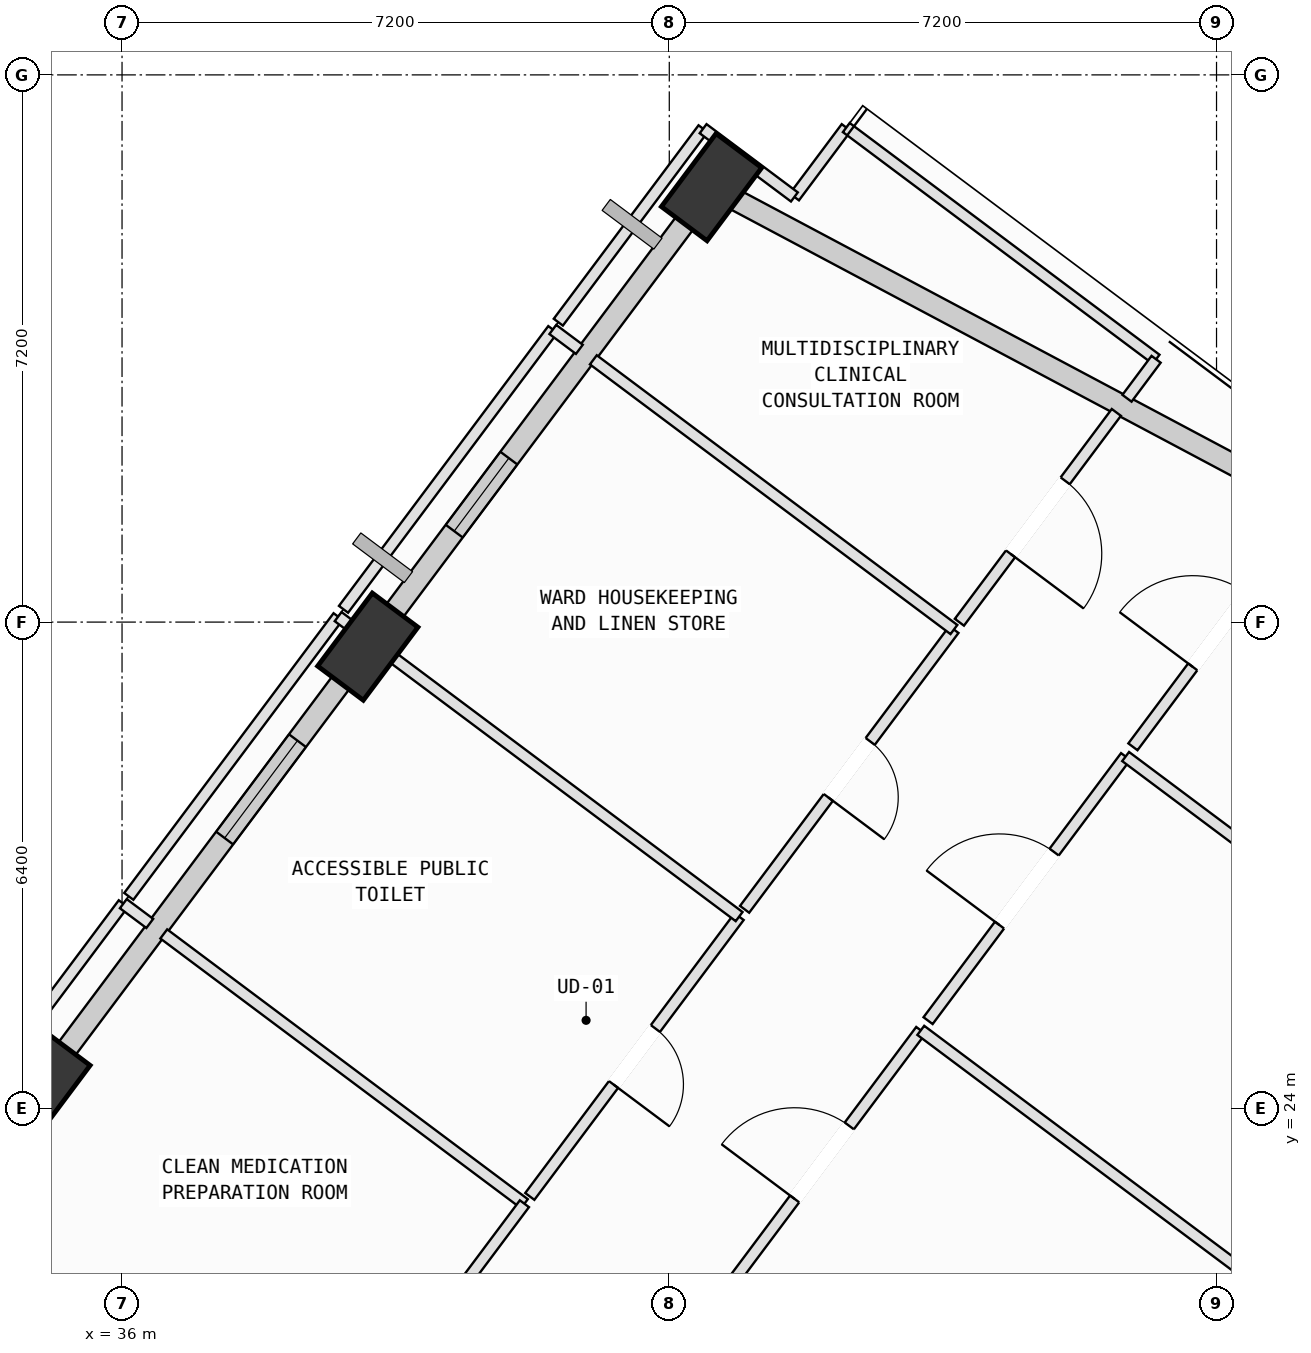
"""IFC4 building model, lengths in metres.
Left out: names, types, materials, properties, quantities, classifications, styles, units other than length and angle.
Written with IfcOpenShell. Run it as: python <this file> out.ifc"""

import sys

from ifc_helpers import new_model, si_unit, direction, frame, frame_2d, origin, origin_2d, place, context, subcontext, project, spatial, rectangle, extrude, element, fill, save


model = new_model("IFC4")
c1 = context("Model", 3, precision=1e-05, world=origin(), true_north=direction((0.0, 1.0)))
c2 = subcontext(c1, "Body", "Model", "MODEL_VIEW")
j1 = project(units=[si_unit("LENGTHUNIT", "METRE"), si_unit("PLANEANGLEUNIT", "RADIAN")], contexts=[c1])
p1 = place(None, origin())
s1 = spatial("IfcSite", under=j1, at=p1, CompositionType="ELEMENT")
p2 = place(p1, origin())
s2 = spatial("IfcBuilding", under=s1, at=p2, CompositionType="ELEMENT")
p3 = place(p2, frame((0.0, 0.0, 251.2)))
s3 = spatial("IfcBuildingStorey", under=s2, at=p3, CompositionType="ELEMENT", Elevation=251.2)
p4 = place(p3, frame((43.756, 36.123, 0.002), z_axis=(-0.047190879507, 0.041581627679, 0.998020034434), x_axis=(0.203571858613, -0.977763785385, 0.050363462655)))
e1 = element("IfcColumn", 1, at=p4, inside=s3, PredefinedType="COLUMN", context=c2, shape_type="SweptSolid", body=[
    extrude(rectangle(XDim=1.2, YDim=0.75, at=origin_2d()), origin(), (0.0, 0.0, 1.0), 4.004),
])
p5 = place(p3, frame((39.234, 30.077, 0.002), z_axis=(-0.022103646467, 0.023141663014, 0.999487814956), x_axis=(0.119606697095, -0.992490609575, 0.025624751993)))
e2 = element("IfcColumn", 2, at=p5, inside=s3, PredefinedType="COLUMN", context=c2, shape_type="SweptSolid", body=[
    extrude(rectangle(XDim=1.2, YDim=0.75, at=origin_2d()), origin(), (0.0, 0.0, 1.0), 3.998),
])
p6 = place(p3, frame((34.921, 24.312, 0.002), z_axis=(0.001954881495, 0.005498104203, 0.999982974499), x_axis=(-0.83265701767, -0.553769318945, 0.004672506767)))
e3 = element("IfcColumn", 3, at=p6, inside=s3, PredefinedType="COLUMN", context=c2, shape_type="SweptSolid", body=[
    extrude(rectangle(XDim=1.2, YDim=0.75, at=origin_2d()), origin(), (0.0, 0.0, 1.0), 3.996),
])
p7 = place(p3, frame((43.998, 35.994, 0.0), z_axis=(0.0, 0.0, 1.0), x_axis=(0.88287143587, -0.469614765233, 0.0)))
e4 = element("IfcWall", 4, at=p7, inside=s3, PredefinedType="SOLIDWALL", context=c2, shape_type="SweptSolid", body=[
    extrude(rectangle(XDim=9.036, YDim=0.28, at=frame_2d((4.518, 0.0))), origin(), (0.0, 0.0, 1.0), 3.265),
])
p8 = place(p3, frame((39.475, 30.4, 0.0), z_axis=(0.0, 0.0, 1.0), x_axis=(0.599014331177, 0.80073830372, 0.0)))
e5 = element("IfcWall", 5, at=p8, inside=s3, PredefinedType="SOLIDWALL", context=c2, shape_type="SweptSolid", body=[
    extrude(rectangle(XDim=6.78, YDim=0.28, at=frame_2d((3.39, 0.0))), origin(), (0.0, 0.0, 1.0), 3.265),
])
p9 = place(p8, frame((1.495, 0.0, 0.75)))
e6 = element("IfcOpeningElement", 6, at=p9, cuts=e5, PredefinedType="OPENING", context=c2, shape_type="SweptSolid", body=[
    extrude(rectangle(XDim=1.2, YDim=1.75, at=frame_2d((0.6, 0.875))), frame((0.0, 0.15, 0.0), z_axis=(0.0, -1.0, 0.0), x_axis=(1.0, 0.0, 0.0)), (0.0, 0.0, 1.0), 0.3),
])
p10 = place(p3, frame((35.165, 24.639, 0.0), z_axis=(0.0, 0.0, 1.0), x_axis=(0.599054928416, 0.800707932233, 0.0)))
e7 = element("IfcWall", 7, at=p10, inside=s3, PredefinedType="SOLIDWALL", context=c2, shape_type="SweptSolid", body=[
    extrude(rectangle(XDim=6.409, YDim=0.28, at=frame_2d((3.205, 0.0))), origin(), (0.0, 0.0, 1.0), 3.265),
])
p11 = place(p10, frame((3.646, 0.0, 0.75)))
e8 = element("IfcOpeningElement", 8, at=p11, cuts=e7, PredefinedType="OPENING", context=c2, shape_type="SweptSolid", body=[
    extrude(rectangle(XDim=1.6, YDim=1.95, at=frame_2d((0.8, 0.975))), frame((0.0, 0.15, 0.0), z_axis=(0.0, -1.0, 0.0), x_axis=(1.0, 0.0, 0.0)), (0.0, 0.0, 1.0), 0.3),
])
p12 = place(p3, frame((43.909, 21.553, 0.0), z_axis=(0.0, 0.0, 1.0), x_axis=(0.599081575716, 0.800687995187, 0.0)))
e9 = element("IfcWall", 9, at=p12, inside=s3, PredefinedType="PARTITIONING", context=c2, shape_type="SweptSolid", body=[
    extrude(rectangle(XDim=4.34, YDim=0.15, at=frame_2d((2.17, 0.0))), origin(), (0.0, 0.0, 1.0), 3.78),
])
p13 = place(p12, frame((1.57, 0.0, 0.0)))
e10 = element("IfcOpeningElement", 10, at=p13, cuts=e9, PredefinedType="OPENING", context=c2, shape_type="SweptSolid", body=[
    extrude(rectangle(XDim=1.2, YDim=2.15, at=frame_2d((0.6, 1.075))), frame((0.0, 0.085, 0.0), z_axis=(0.0, -1.0, 0.0), x_axis=(1.0, 0.0, 0.0)), (0.0, 0.0, 1.0), 0.17),
])
p14 = place(p3, frame((46.509, 25.028, 0.0), z_axis=(0.0, 0.0, 1.0), x_axis=(0.800743159028, -0.599007840741, 0.0)))
e11 = element("IfcWall", 11, at=p14, inside=s3, PredefinedType="PARTITIONING", context=c2, shape_type="SweptSolid", body=[
    extrude(rectangle(XDim=11.935, YDim=0.15, at=frame_2d((5.968, 0.0))), origin(), (0.0, 0.0, 1.0), 3.78),
])
p15 = place(p3, frame((46.605, 25.156, 0.0), z_axis=(0.0, 0.0, 1.0), x_axis=(0.598937294168, 0.800795927596, 0.0)))
e12 = element("IfcWall", 12, at=p15, inside=s3, PredefinedType="PARTITIONING", context=c2, shape_type="SweptSolid", body=[
    extrude(rectangle(XDim=4.34, YDim=0.15, at=frame_2d((2.17, 0.0))), origin(), (0.0, 0.0, 1.0), 3.78),
])
p16 = place(p15, frame((1.57, 0.0, 0.0)))
e13 = element("IfcOpeningElement", 13, at=p16, cuts=e12, PredefinedType="OPENING", context=c2, shape_type="SweptSolid", body=[
    extrude(rectangle(XDim=1.2, YDim=2.15, at=frame_2d((0.6, 1.075))), frame((0.0, 0.085, 0.0), z_axis=(0.0, -1.0, 0.0), x_axis=(1.0, 0.0, 0.0)), (0.0, 0.0, 1.0), 0.17),
])
p17 = place(p3, frame((49.204, 28.631, 0.0), z_axis=(0.0, 0.0, 1.0), x_axis=(0.800718737754, -0.599040485284, 0.0)))
e14 = element("IfcWall", 14, at=p17, inside=s3, PredefinedType="PARTITIONING", context=c2, shape_type="SweptSolid", body=[
    extrude(rectangle(XDim=11.363, YDim=0.15, at=frame_2d((5.682, 0.0))), origin(), (0.0, 0.0, 1.0), 3.78),
])
p18 = place(p3, frame((49.3, 28.759, 0.0), z_axis=(0.0, 0.0, 1.0), x_axis=(0.599040287777, 0.800718885515, 0.0)))
e15 = element("IfcWall", 15, at=p18, inside=s3, PredefinedType="PARTITIONING", context=c2, shape_type="SweptSolid", body=[
    extrude(rectangle(XDim=3.828, YDim=0.15, at=frame_2d((1.914, 0.0))), origin(), (0.0, 0.0, 1.0), 3.78),
])
p19 = place(p18, frame((1.314, 0.0, 0.0)))
e16 = element("IfcOpeningElement", 16, at=p19, cuts=e15, PredefinedType="OPENING", context=c2, shape_type="SweptSolid", body=[
    extrude(rectangle(XDim=1.2, YDim=2.15, at=frame_2d((0.6, 1.075))), frame((0.0, 0.085, 0.0), z_axis=(0.0, -1.0, 0.0), x_axis=(1.0, 0.0, 0.0)), (0.0, 0.0, 1.0), 0.17),
])
p20 = place(p3, frame((33.263, 23.014, 0.0), z_axis=(0.0, 0.0, 1.0), x_axis=(0.599064962101, 0.800700425367, 0.0)))
e17 = element("IfcWall", 17, at=p20, inside=s3, PredefinedType="PARTITIONING", context=c2, shape_type="SweptSolid", body=[
    extrude(rectangle(XDim=4.597, YDim=0.15, at=frame_2d((2.299, 0.0))), origin(), (0.0, 0.0, 1.0), 3.78),
])
p21 = place(p3, frame((36.017, 26.695, 0.0), z_axis=(0.0, 0.0, 1.0), x_axis=(0.80101066545, -0.598650076284, 0.0)))
e18 = element("IfcWall", 18, at=p21, inside=s3, PredefinedType="PARTITIONING", context=c2, shape_type="SweptSolid", body=[
    extrude(rectangle(XDim=0.434, YDim=0.15, at=frame_2d((0.217, 0.0))), origin(), (0.0, 0.0, 1.0), 3.78),
])
p22 = place(p3, frame((36.549, 26.297, 0.0), z_axis=(0.0, 0.0, 1.0), x_axis=(0.800696541922, -0.599070152616, 0.0)))
e19 = element("IfcWall", 19, at=p22, inside=s3, PredefinedType="PARTITIONING", context=c2, shape_type="SweptSolid", body=[
    extrude(rectangle(XDim=5.926, YDim=0.15, at=frame_2d((2.963, 0.0))), origin(), (0.0, 0.0, 1.0), 3.78),
])
p23 = place(p3, frame((41.294, 22.747, 0.0), z_axis=(0.0, 0.0, 1.0), x_axis=(-0.599137256843, -0.800646331074, 0.0)))
e20 = element("IfcWall", 20, at=p23, inside=s3, PredefinedType="PARTITIONING", context=c2, shape_type="SweptSolid", body=[
    extrude(rectangle(XDim=2.582, YDim=0.15, at=frame_2d((1.291, 0.0))), origin(), (0.0, 0.0, 1.0), 3.78),
])
p24 = place(p3, frame((36.382, 20.68, 0.0), z_axis=(0.0, 0.0, 1.0), x_axis=(-0.800643257671, 0.599141363908, 0.0)))
e21 = element("IfcWall", 21, at=p24, inside=s3, PredefinedType="PARTITIONING", context=c2, shape_type="SweptSolid", body=[
    extrude(rectangle(XDim=3.231, YDim=0.15, at=frame_2d((1.616, 0.0))), origin(), (0.0, 0.0, 1.0), 3.78),
])
p25 = place(p3, frame((44.119, 26.525, 0.0), z_axis=(0.0, 0.0, 1.0), x_axis=(-0.598954503675, -0.800783055844, 0.0)))
e22 = element("IfcWall", 22, at=p25, inside=s3, PredefinedType="PARTITIONING", context=c2, shape_type="SweptSolid", body=[
    extrude(rectangle(XDim=4.598, YDim=0.15, at=frame_2d((2.299, 0.0))), origin(), (0.0, 0.0, 1.0), 3.78),
])
p26 = place(p25, frame((1.839, 0.0, 0.0)))
e23 = element("IfcOpeningElement", 23, at=p26, cuts=e22, PredefinedType="OPENING", context=c2, shape_type="SweptSolid", body=[
    extrude(rectangle(XDim=0.92, YDim=2.1, at=frame_2d((0.46, 1.05))), frame((0.0, 0.085, 0.0), z_axis=(0.0, -1.0, 0.0), x_axis=(1.0, 0.0, 0.0)), (0.0, 0.0, 1.0), 0.17),
])
p27 = place(p3, frame((36.089, 26.791, 0.0), z_axis=(0.0, 0.0, 1.0), x_axis=(0.599056387828, 0.800706840362, 0.0)))
e24 = element("IfcWall", 24, at=p27, inside=s3, PredefinedType="PARTITIONING", context=c2, shape_type="SweptSolid", body=[
    extrude(rectangle(XDim=4.597, YDim=0.15, at=frame_2d((2.299, 0.0))), origin(), (0.0, 0.0, 1.0), 3.265),
])
p28 = place(p3, frame((38.843, 30.472, 0.0), z_axis=(0.0, 0.0, 1.0), x_axis=(0.800719737782, -0.599039148576, 0.0)))
e25 = element("IfcWall", 25, at=p28, inside=s3, PredefinedType="PARTITIONING", context=c2, shape_type="SweptSolid", body=[
    extrude(rectangle(XDim=6.589, YDim=0.15, at=frame_2d((3.294, 0.0))), origin(), (0.0, 0.0, 1.0), 3.78),
])
p29 = place(p3, frame((46.945, 30.302, 0.0), z_axis=(0.0, 0.0, 1.0), x_axis=(-0.599090435307, -0.80068136629, 0.0)))
e26 = element("IfcWall", 26, at=p29, inside=s3, PredefinedType="PARTITIONING", context=c2, shape_type="SweptSolid", body=[
    extrude(rectangle(XDim=4.597, YDim=0.15, at=frame_2d((2.299, 0.0))), origin(), (0.0, 0.0, 1.0), 3.78),
])
p30 = place(p29, frame((1.839, 0.0, 0.0)))
e27 = element("IfcOpeningElement", 27, at=p30, cuts=e26, PredefinedType="OPENING", context=c2, shape_type="SweptSolid", body=[
    extrude(rectangle(XDim=0.92, YDim=2.1, at=frame_2d((0.46, 1.05))), frame((0.0, 0.085, 0.0), z_axis=(0.0, -1.0, 0.0), x_axis=(1.0, 0.0, 0.0)), (0.0, 0.0, 1.0), 0.17),
])
p31 = place(p3, frame((38.914, 30.568, 0.0), z_axis=(0.0, 0.0, 1.0), x_axis=(0.598954503675, 0.800783055844, 0.0)))
e28 = element("IfcWall", 28, at=p31, inside=s3, PredefinedType="PARTITIONING", context=c2, shape_type="SweptSolid", body=[
    extrude(rectangle(XDim=4.598, YDim=0.15, at=frame_2d((2.299, 0.0))), origin(), (0.0, 0.0, 1.0), 3.265),
])
p32 = place(p3, frame((41.668, 34.25, 0.0), z_axis=(0.0, 0.0, 1.0), x_axis=(0.800939980659, -0.598744642884, 0.0)))
e29 = element("IfcWall", 29, at=p32, inside=s3, PredefinedType="PARTITIONING", context=c2, shape_type="SweptSolid", body=[
    extrude(rectangle(XDim=0.436, YDim=0.15, at=frame_2d((0.218, 0.0))), origin(), (0.0, 0.0, 1.0), 3.78),
])
p33 = place(p3, frame((42.201, 33.851, 0.0), z_axis=(0.0, 0.0, 1.0), x_axis=(0.800731238319, -0.599023775805, 0.0)))
e30 = element("IfcWall", 30, at=p33, inside=s3, PredefinedType="PARTITIONING", context=c2, shape_type="SweptSolid", body=[
    extrude(rectangle(XDim=5.925, YDim=0.15, at=frame_2d((2.962, 0.0))), origin(), (0.0, 0.0, 1.0), 3.78),
])
p34 = place(p3, frame((44.846, 35.994, 0.0), z_axis=(0.0, 0.0, 1.0), x_axis=(0.599040418987, 0.800718787353, 0.0)))
e31 = element("IfcWall", 31, at=p34, inside=s3, PredefinedType="PARTITIONING", context=c2, shape_type="SweptSolid", body=[
    extrude(rectangle(XDim=1.14, YDim=0.15, at=frame_2d((0.57, 0.0))), origin(), (0.0, 0.0, 1.0), 3.78),
])
p35 = place(p3, frame((45.529, 36.907, 0.0), z_axis=(0.0, 0.0, 1.0), x_axis=(0.800741854333, -0.599009584831, 0.0)))
e32 = element("IfcWall", 32, at=p35, inside=s3, PredefinedType="PARTITIONING", context=c2, shape_type="SweptSolid", body=[
    extrude(rectangle(XDim=5.09, YDim=0.15, at=frame_2d((2.545, 0.0))), origin(), (0.0, 0.0, 1.0), 3.78),
])
p36 = place(p3, frame((49.605, 33.858, 0.0), z_axis=(0.0, 0.0, 1.0), x_axis=(-0.598351259645, -0.801233904725, 0.0)))
e33 = element("IfcWall", 33, at=p36, inside=s3, PredefinedType="PARTITIONING", context=c2, shape_type="SweptSolid", body=[
    extrude(rectangle(XDim=0.64, YDim=0.15, at=frame_2d((0.32, 0.0))), origin(), (0.0, 0.0, 1.0), 3.78),
])
p37 = place(p3, frame((49.082, 33.159, 0.0), z_axis=(0.0, 0.0, 1.0), x_axis=(-0.598923123133, -0.800806526308, 0.0)))
e34 = element("IfcWall", 34, at=p37, inside=s3, PredefinedType="PARTITIONING", context=c2, shape_type="SweptSolid", body=[
    extrude(rectangle(XDim=3.448, YDim=0.15, at=frame_2d((1.724, 0.0))), origin(), (0.0, 0.0, 1.0), 3.78),
])
p38 = place(p37, frame((1.124, 0.0, 0.0)))
e35 = element("IfcOpeningElement", 35, at=p38, cuts=e34, PredefinedType="OPENING", context=c2, shape_type="SweptSolid", body=[
    extrude(rectangle(XDim=1.2, YDim=2.15, at=frame_2d((0.6, 1.075))), frame((0.0, 0.085, 0.0), z_axis=(0.0, -1.0, 0.0), x_axis=(1.0, 0.0, 0.0)), (0.0, 0.0, 1.0), 0.17),
])
p39 = place(p3, frame((41.74, 34.346, 0.0), z_axis=(0.0, 0.0, 1.0), x_axis=(0.599078297552, 0.800690447927, 0.0)))
e36 = element("IfcWall", 36, at=p39, inside=s3, PredefinedType="PARTITIONING", context=c2, shape_type="SweptSolid", body=[
    extrude(rectangle(XDim=3.18, YDim=0.15, at=frame_2d((1.59, 0.0))), origin(), (0.0, 0.0, 1.0), 3.265),
])
p40 = place(p3, frame((43.645, 36.892, 0.0), z_axis=(0.0, 0.0, 1.0), x_axis=(0.800800250223, -0.598931514651, 0.0)))
e37 = element("IfcWall", 37, at=p40, inside=s3, PredefinedType="PARTITIONING", context=c2, shape_type="SweptSolid", body=[
    extrude(rectangle(XDim=1.5, YDim=0.15, at=frame_2d((0.75, 0.0))), origin(), (0.0, 0.0, 1.0), 3.265),
])
p41 = place(p9, origin())
e38 = element("IfcWindow", 38, at=p41, inside=s3, PartitioningType="SINGLE_PANEL", PredefinedType="WINDOW", context=c2, shape_type="SweptSolid", body=[
    extrude(rectangle(XDim=1.2, YDim=1.75, at=frame_2d((0.6, 0.875))), frame((0.0, 0.03, 0.0), z_axis=(0.0, -1.0, 0.0), x_axis=(1.0, 0.0, 0.0)), (0.0, 0.0, 1.0), 0.06),
])
fill(e6, e38)
p42 = place(p11, origin())
e39 = element("IfcWindow", 39, at=p42, inside=s3, PartitioningType="SINGLE_PANEL", PredefinedType="WINDOW", context=c2, shape_type="SweptSolid", body=[
    extrude(rectangle(XDim=1.6, YDim=1.95, at=frame_2d((0.8, 0.975))), frame((0.0, 0.03, 0.0), z_axis=(0.0, -1.0, 0.0), x_axis=(1.0, 0.0, 0.0)), (0.0, 0.0, 1.0), 0.06),
])
fill(e8, e39)
p43 = place(p13, origin())
e40 = element("IfcDoor", 40, at=p43, inside=s3, OperationType="SINGLE_SWING_LEFT", PredefinedType="DOOR", context=c2, shape_type="SweptSolid", body=[
    extrude(rectangle(XDim=1.2, YDim=2.15, at=frame_2d((0.6, 1.075))), frame((0.0, 0.025, 0.0), z_axis=(0.0, -1.0, 0.0), x_axis=(1.0, 0.0, 0.0)), (0.0, 0.0, 1.0), 0.05),
])
fill(e10, e40)
p44 = place(p16, origin())
e41 = element("IfcDoor", 41, at=p44, inside=s3, OperationType="SINGLE_SWING_LEFT", PredefinedType="DOOR", context=c2, shape_type="SweptSolid", body=[
    extrude(rectangle(XDim=1.2, YDim=2.15, at=frame_2d((0.6, 1.075))), frame((0.0, 0.025, 0.0), z_axis=(0.0, -1.0, 0.0), x_axis=(1.0, 0.0, 0.0)), (0.0, 0.0, 1.0), 0.05),
])
fill(e13, e41)
p45 = place(p19, origin())
e42 = element("IfcDoor", 42, at=p45, inside=s3, OperationType="SINGLE_SWING_LEFT", PredefinedType="DOOR", context=c2, shape_type="SweptSolid", body=[
    extrude(rectangle(XDim=1.2, YDim=2.15, at=frame_2d((0.6, 1.075))), frame((0.0, 0.025, 0.0), z_axis=(0.0, -1.0, 0.0), x_axis=(1.0, 0.0, 0.0)), (0.0, 0.0, 1.0), 0.05),
])
fill(e16, e42)
p46 = place(p26, origin())
e43 = element("IfcDoor", 43, at=p46, inside=s3, OperationType="SINGLE_SWING_RIGHT", PredefinedType="DOOR", context=c2, shape_type="SweptSolid", body=[
    extrude(rectangle(XDim=0.92, YDim=2.1, at=frame_2d((0.46, 1.05))), frame((0.0, 0.025, 0.0), z_axis=(0.0, -1.0, 0.0), x_axis=(1.0, 0.0, 0.0)), (0.0, 0.0, 1.0), 0.05),
])
fill(e23, e43)
p47 = place(p30, origin())
e44 = element("IfcDoor", 44, at=p47, inside=s3, OperationType="SINGLE_SWING_RIGHT", PredefinedType="DOOR", context=c2, shape_type="SweptSolid", body=[
    extrude(rectangle(XDim=0.92, YDim=2.1, at=frame_2d((0.46, 1.05))), frame((0.0, 0.025, 0.0), z_axis=(0.0, -1.0, 0.0), x_axis=(1.0, 0.0, 0.0)), (0.0, 0.0, 1.0), 0.05),
])
fill(e27, e44)
p48 = place(p38, origin())
e45 = element("IfcDoor", 45, at=p48, inside=s3, OperationType="SINGLE_SWING_RIGHT", PredefinedType="DOOR", context=c2, shape_type="SweptSolid", body=[
    extrude(rectangle(XDim=1.2, YDim=2.15, at=frame_2d((0.6, 1.075))), frame((0.0, 0.025, 0.0), z_axis=(0.0, -1.0, 0.0), x_axis=(1.0, 0.0, 0.0)), (0.0, 0.0, 1.0), 0.05),
])
fill(e35, e45)
save(model, sys.argv[1])
